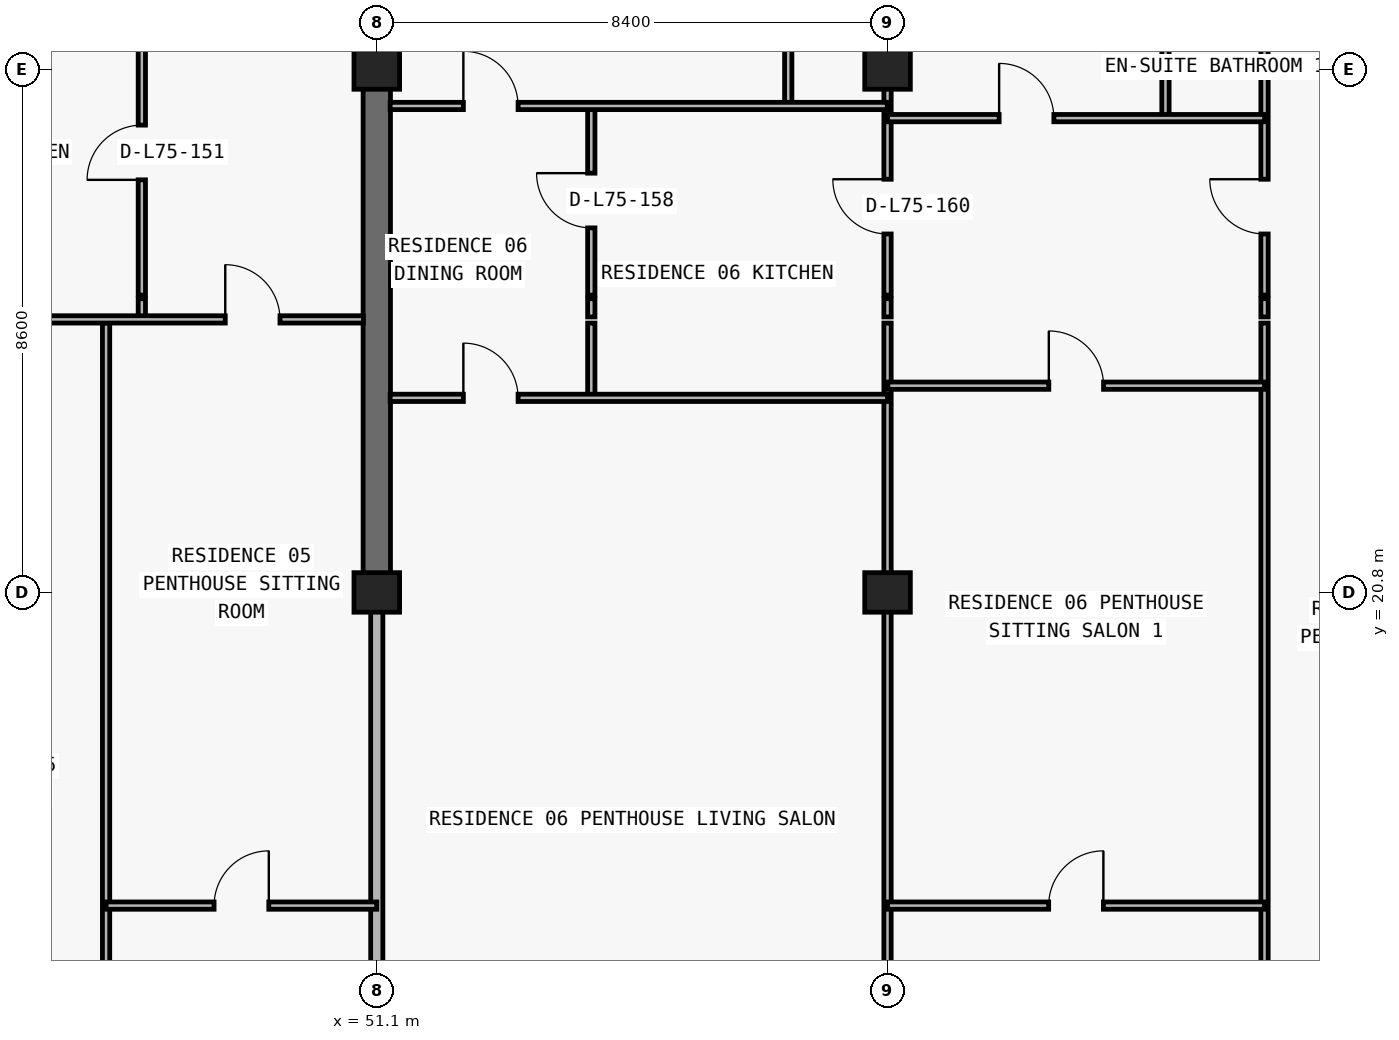
"""IFC4 building model, lengths in metres.
Left out: names, types, materials, properties, quantities, classifications, styles, units other than length and angle.
Written with IfcOpenShell. Run it as: python <this file> out.ifc"""

import sys

from ifc_helpers import new_model, si_unit, direction, frame, frame_2d, origin, origin_2d, place, context, subcontext, project, spatial, rectangle, extrude, element, fill, save


model = new_model("IFC4")
c1 = context("Model", 3, precision=1e-05, world=origin(), true_north=direction((0.0, 1.0)))
c2 = subcontext(c1, "Body", "Model", "MODEL_VIEW")
j1 = project(units=[si_unit("LENGTHUNIT", "METRE"), si_unit("PLANEANGLEUNIT", "RADIAN")], contexts=[c1])
p1 = place(None, origin())
s1 = spatial("IfcSite", under=j1, at=p1, CompositionType="ELEMENT")
p2 = place(p1, origin())
s2 = spatial("IfcBuilding", under=s1, at=p2, CompositionType="ELEMENT")
p3 = place(p2, frame((0.0, 0.0, 266.1)))
s3 = spatial("IfcBuildingStorey", under=s2, at=p3, CompositionType="ELEMENT", Elevation=266.1)
for number, where, z_axis, x_axis in (
    (1, (51.1, 20.8, 0.0), (0.0, 0.0, 1.0), (1.0, 0.0, 0.0)),
    (2, (59.5, 20.8, 0.0), (0.0, 0.0, 1.0), (1.0, 0.0, 0.0)),
    (3, (51.1, 29.4, 0.0), (0.0, 0.0, 1.0), (1.0, 0.0, 0.0)),
    (4, (59.5, 29.4, 0.0), (0.0, 0.0, 1.0), (1.0, 0.0, 0.0)),
):
    element("IfcColumn", number, at=place(p3, frame(where, z_axis=z_axis, x_axis=x_axis)), inside=s3, PredefinedType="COLUMN", context=c2, shape_type="SweptSolid", body=[
        extrude(rectangle(XDim=0.75, YDim=0.65, at=origin_2d()), origin(), (0.0, 0.0, 1.0), 3.0),
    ])
p4 = place(p3, frame((51.1, 20.8, 0.0), z_axis=(0.0, 0.0, 1.0), x_axis=(0.0, 1.0, 0.0)))
e5 = element("IfcWall", 5, at=p4, inside=s3, PredefinedType="SHEAR", context=c2, shape_type="SweptSolid", body=[
    extrude(rectangle(XDim=8.6, YDim=0.45, at=frame_2d((4.3, 0.0))), origin(), (0.0, 0.0, 1.0), 3.0),
])
p5 = place(p3, frame((46.648, 13.34, 0.0), z_axis=(0.0, 0.0, 1.0), x_axis=(0.0, 1.0, 0.0)))
e6 = element("IfcWall", 6, at=p5, inside=s3, PredefinedType="PARTITIONING", context=c2, shape_type="SweptSolid", body=[
    extrude(rectangle(XDim=11.89, YDim=0.12, at=frame_2d((5.945, 0.0))), origin(), (0.0, 0.0, 1.0), 3.0),
])
p6 = place(p3, frame((47.236, 25.33, 0.0), z_axis=(0.0, 0.0, 1.0), x_axis=(0.0, 1.0, 0.0)))
e7 = element("IfcWall", 7, at=p6, inside=s3, PredefinedType="PARTITIONING", context=c2, shape_type="SweptSolid", body=[
    extrude(rectangle(XDim=0.3, YDim=0.12, at=frame_2d((0.15, 0.0))), origin(), (0.0, 0.0, 1.0), 3.0),
])
p7 = place(p3, frame((47.236, 25.69, 0.0), z_axis=(0.0, 0.0, 1.0), x_axis=(0.0, 1.0, 0.0)))
e8 = element("IfcWall", 8, at=p7, inside=s3, PredefinedType="PARTITIONING", context=c2, shape_type="SweptSolid", body=[
    extrude(rectangle(XDim=4.69, YDim=0.12, at=frame_2d((2.345, 0.0))), origin(), (0.0, 0.0, 1.0), 3.0),
])
p8 = place(p7, frame((1.895, 0.0, 0.0)))
e9 = element("IfcOpeningElement", 9, at=p8, cuts=e8, PredefinedType="OPENING", context=c2, shape_type="SweptSolid", body=[
    extrude(rectangle(XDim=0.9, YDim=2.15, at=frame_2d((0.45, 1.075))), frame((0.0, 0.07, 0.0), z_axis=(0.0, -1.0, 0.0), x_axis=(1.0, 0.0, 0.0)), (0.0, 0.0, 1.0), 0.14),
])
p9 = place(p3, frame((51.1, 13.34, 0.0), z_axis=(0.0, 0.0, 1.0), x_axis=(0.0, 1.0, 0.0)))
e10 = element("IfcWall", 10, at=p9, inside=s3, PredefinedType="PARTITIONING", context=c2, shape_type="SweptSolid", body=[
    extrude(rectangle(XDim=7.455, YDim=0.2, at=frame_2d((3.728, 0.0))), origin(), (0.0, 0.0, 1.0), 2.213),
])
p10 = place(p3, frame((51.1, 29.405, 0.0), z_axis=(0.0, 0.0, 1.0), x_axis=(0.0, 1.0, 0.0)))
e11 = element("IfcWall", 11, at=p10, inside=s3, PredefinedType="PARTITIONING", context=c2, shape_type="SweptSolid", body=[
    extrude(rectangle(XDim=0.975, YDim=0.2, at=frame_2d((0.487, 0.0))), origin(), (0.0, 0.0, 1.0), 2.285),
])
p11 = place(p3, frame((54.628, 24.0, 0.0), z_axis=(0.0, 0.0, 1.0), x_axis=(0.0, 1.0, 0.0)))
e12 = element("IfcWall", 12, at=p11, inside=s3, PredefinedType="PARTITIONING", context=c2, shape_type="SweptSolid", body=[
    extrude(rectangle(XDim=1.23, YDim=0.12, at=frame_2d((0.615, 0.0))), origin(), (0.0, 0.0, 1.0), 3.0),
])
p12 = place(p3, frame((54.628, 25.33, 0.0), z_axis=(0.0, 0.0, 1.0), x_axis=(0.0, 1.0, 0.0)))
e13 = element("IfcWall", 13, at=p12, inside=s3, PredefinedType="PARTITIONING", context=c2, shape_type="SweptSolid", body=[
    extrude(rectangle(XDim=0.3, YDim=0.12, at=frame_2d((0.15, 0.0))), origin(), (0.0, 0.0, 1.0), 3.0),
])
p13 = place(p3, frame((54.628, 25.69, 0.0), z_axis=(0.0, 0.0, 1.0), x_axis=(0.0, 1.0, 0.0)))
e14 = element("IfcWall", 14, at=p13, inside=s3, PredefinedType="PARTITIONING", context=c2, shape_type="SweptSolid", body=[
    extrude(rectangle(XDim=3.11, YDim=0.12, at=frame_2d((1.555, 0.0))), origin(), (0.0, 0.0, 1.0), 3.0),
])
p14 = place(p13, frame((1.105, 0.0, 0.0)))
e15 = element("IfcOpeningElement", 15, at=p14, cuts=e14, PredefinedType="OPENING", context=c2, shape_type="SweptSolid", body=[
    extrude(rectangle(XDim=0.9, YDim=2.15, at=frame_2d((0.45, 1.075))), frame((0.0, 0.07, 0.0), z_axis=(0.0, -1.0, 0.0), x_axis=(1.0, 0.0, 0.0)), (0.0, 0.0, 1.0), 0.14),
])
p15 = place(p3, frame((57.867, 28.8, 0.0), z_axis=(0.0, 0.0, 1.0), x_axis=(0.0, 1.0, 0.0)))
e16 = element("IfcWall", 16, at=p15, inside=s3, PredefinedType="PARTITIONING", context=c2, shape_type="SweptSolid", body=[
    extrude(rectangle(XDim=1.58, YDim=0.12, at=frame_2d((0.79, 0.0))), origin(), (0.0, 0.0, 1.0), 3.0),
])
p16 = place(p3, frame((59.5, 13.34, 0.0), z_axis=(0.0, 0.0, 1.0), x_axis=(0.0, 1.0, 0.0)))
e17 = element("IfcWall", 17, at=p16, inside=s3, PredefinedType="PARTITIONING", context=c2, shape_type="SweptSolid", body=[
    extrude(rectangle(XDim=11.89, YDim=0.12, at=frame_2d((5.945, 0.0))), origin(), (0.0, 0.0, 1.0), 2.213),
])
p17 = place(p3, frame((59.5, 25.33, 0.0), z_axis=(0.0, 0.0, 1.0), x_axis=(0.0, 1.0, 0.0)))
e18 = element("IfcWall", 18, at=p17, inside=s3, PredefinedType="PARTITIONING", context=c2, shape_type="SweptSolid", body=[
    extrude(rectangle(XDim=0.3, YDim=0.12, at=frame_2d((0.15, 0.0))), origin(), (0.0, 0.0, 1.0), 2.213),
])
p18 = place(p3, frame((59.5, 25.69, 0.0), z_axis=(0.0, 0.0, 1.0), x_axis=(0.0, 1.0, 0.0)))
e19 = element("IfcWall", 19, at=p18, inside=s3, PredefinedType="PARTITIONING", context=c2, shape_type="SweptSolid", body=[
    extrude(rectangle(XDim=4.69, YDim=0.12, at=frame_2d((2.345, 0.0))), origin(), (0.0, 0.0, 1.0), 2.213),
])
p19 = place(p18, frame((1.005, 0.0, 0.0)))
e20 = element("IfcOpeningElement", 20, at=p19, cuts=e19, PredefinedType="OPENING", context=c2, shape_type="SweptSolid", body=[
    extrude(rectangle(XDim=0.9, YDim=2.15, at=frame_2d((0.45, 1.075))), frame((0.0, 0.07, 0.0), z_axis=(0.0, -1.0, 0.0), x_axis=(1.0, 0.0, 0.0)), (0.0, 0.0, 1.0), 0.14),
])
p20 = place(p3, frame((64.071, 28.6, 0.0), z_axis=(0.0, 0.0, 1.0), x_axis=(0.0, 1.0, 0.0)))
e21 = element("IfcWall", 21, at=p20, inside=s3, PredefinedType="PARTITIONING", context=c2, shape_type="SweptSolid", body=[
    extrude(rectangle(XDim=1.78, YDim=0.12, at=frame_2d((0.89, 0.0))), origin(), (0.0, 0.0, 1.0), 3.0),
])
p21 = place(p3, frame((65.7, 13.42, 0.0), z_axis=(0.0, 0.0, 1.0), x_axis=(0.0, 1.0, 0.0)))
e22 = element("IfcWall", 22, at=p21, inside=s3, PredefinedType="PARTITIONING", context=c2, shape_type="SweptSolid", body=[
    extrude(rectangle(XDim=11.81, YDim=0.12, at=frame_2d((5.905, 0.0))), origin(), (0.0, 0.0, 1.0), 3.0),
])
p22 = place(p3, frame((65.7, 25.33, 0.0), z_axis=(0.0, 0.0, 1.0), x_axis=(0.0, 1.0, 0.0)))
e23 = element("IfcWall", 23, at=p22, inside=s3, PredefinedType="PARTITIONING", context=c2, shape_type="SweptSolid", body=[
    extrude(rectangle(XDim=0.3, YDim=0.12, at=frame_2d((0.15, 0.0))), origin(), (0.0, 0.0, 1.0), 3.0),
])
p23 = place(p3, frame((65.7, 25.69, 0.0), z_axis=(0.0, 0.0, 1.0), x_axis=(0.0, 1.0, 0.0)))
e24 = element("IfcWall", 24, at=p23, inside=s3, PredefinedType="PARTITIONING", context=c2, shape_type="SweptSolid", body=[
    extrude(rectangle(XDim=4.69, YDim=0.12, at=frame_2d((2.345, 0.0))), origin(), (0.0, 0.0, 1.0), 3.0),
])
p24 = place(p23, frame((1.005, 0.0, 0.0)))
e25 = element("IfcOpeningElement", 25, at=p24, cuts=e24, PredefinedType="OPENING", context=c2, shape_type="SweptSolid", body=[
    extrude(rectangle(XDim=0.9, YDim=2.15, at=frame_2d((0.45, 1.075))), frame((0.0, 0.07, 0.0), z_axis=(0.0, -1.0, 0.0), x_axis=(1.0, 0.0, 0.0)), (0.0, 0.0, 1.0), 0.14),
])
p25 = place(p3, frame((46.648, 15.65, 0.0), z_axis=(0.0, 0.0, 1.0), x_axis=(1.0, 0.0, 0.0)))
e26 = element("IfcWall", 26, at=p25, inside=s3, PredefinedType="PARTITIONING", context=c2, shape_type="SweptSolid", body=[
    extrude(rectangle(XDim=4.452, YDim=0.12, at=frame_2d((2.226, 0.0))), origin(), (0.0, 0.0, 1.0), 3.0),
])
p26 = place(p25, frame((1.776, 0.0, 0.0)))
e27 = element("IfcOpeningElement", 27, at=p26, cuts=e26, PredefinedType="OPENING", context=c2, shape_type="SweptSolid", body=[
    extrude(rectangle(XDim=0.9, YDim=2.15, at=frame_2d((0.45, 1.075))), frame((0.0, 0.07, 0.0), z_axis=(0.0, -1.0, 0.0), x_axis=(1.0, 0.0, 0.0)), (0.0, 0.0, 1.0), 0.14),
])
p27 = place(p3, frame((59.5, 15.65, 0.0), z_axis=(0.0, 0.0, 1.0), x_axis=(1.0, 0.0, 0.0)))
e28 = element("IfcWall", 28, at=p27, inside=s3, PredefinedType="PARTITIONING", context=c2, shape_type="SweptSolid", body=[
    extrude(rectangle(XDim=6.2, YDim=0.12, at=frame_2d((3.1, 0.0))), origin(), (0.0, 0.0, 1.0), 3.0),
])
p28 = place(p27, frame((2.65, 0.0, 0.0)))
e29 = element("IfcOpeningElement", 29, at=p28, cuts=e28, PredefinedType="OPENING", context=c2, shape_type="SweptSolid", body=[
    extrude(rectangle(XDim=0.9, YDim=2.15, at=frame_2d((0.45, 1.075))), frame((0.0, 0.07, 0.0), z_axis=(0.0, -1.0, 0.0), x_axis=(1.0, 0.0, 0.0)), (0.0, 0.0, 1.0), 0.14),
])
p29 = place(p3, frame((51.32, 24.0, 0.0), z_axis=(0.0, 0.0, 1.0), x_axis=(1.0, 0.0, 0.0)))
e30 = element("IfcWall", 30, at=p29, inside=s3, PredefinedType="PARTITIONING", context=c2, shape_type="SweptSolid", body=[
    extrude(rectangle(XDim=8.18, YDim=0.12, at=frame_2d((4.09, 0.0))), origin(), (0.0, 0.0, 1.0), 3.0),
])
p30 = place(p29, frame((1.204, 0.0, 0.0)))
e31 = element("IfcOpeningElement", 31, at=p30, cuts=e30, PredefinedType="OPENING", context=c2, shape_type="SweptSolid", body=[
    extrude(rectangle(XDim=0.9, YDim=2.15, at=frame_2d((0.45, 1.075))), frame((0.0, 0.07, 0.0), z_axis=(0.0, -1.0, 0.0), x_axis=(1.0, 0.0, 0.0)), (0.0, 0.0, 1.0), 0.14),
])
p31 = place(p3, frame((59.505, 24.2, 0.0), z_axis=(0.0, 0.0, 1.0), x_axis=(1.0, 0.0, 0.0)))
e32 = element("IfcWall", 32, at=p31, inside=s3, PredefinedType="PARTITIONING", context=c2, shape_type="SweptSolid", body=[
    extrude(rectangle(XDim=6.195, YDim=0.12, at=frame_2d((3.098, 0.0))), origin(), (0.0, 0.0, 1.0), 3.0),
])
p32 = place(p31, frame((2.647, 0.0, 0.0)))
e33 = element("IfcOpeningElement", 33, at=p32, cuts=e32, PredefinedType="OPENING", context=c2, shape_type="SweptSolid", body=[
    extrude(rectangle(XDim=0.9, YDim=2.15, at=frame_2d((0.45, 1.075))), frame((0.0, 0.07, 0.0), z_axis=(0.0, -1.0, 0.0), x_axis=(1.0, 0.0, 0.0)), (0.0, 0.0, 1.0), 0.14),
])
p33 = place(p3, frame((42.7, 25.29, 0.0), z_axis=(0.0, 0.0, 1.0), x_axis=(1.0, 0.0, 0.0)))
e34 = element("IfcWall", 34, at=p33, inside=s3, PredefinedType="PARTITIONING", context=c2, shape_type="SweptSolid", body=[
    extrude(rectangle(XDim=8.18, YDim=0.12, at=frame_2d((4.09, 0.0))), origin(), (0.0, 0.0, 1.0), 3.0),
])
p34 = place(p33, frame((1.524, 0.0, 0.0)))
e35 = element("IfcOpeningElement", 35, at=p34, cuts=e34, PredefinedType="OPENING", context=c2, shape_type="SweptSolid", body=[
    extrude(rectangle(XDim=0.9, YDim=2.15, at=frame_2d((0.45, 1.075))), frame((0.0, 0.07, 0.0), z_axis=(0.0, -1.0, 0.0), x_axis=(1.0, 0.0, 0.0)), (0.0, 0.0, 1.0), 0.14),
])
p35 = place(p33, frame((5.908, 0.0, 0.0)))
e36 = element("IfcOpeningElement", 36, at=p35, cuts=e34, PredefinedType="OPENING", context=c2, shape_type="SweptSolid", body=[
    extrude(rectangle(XDim=0.9, YDim=2.15, at=frame_2d((0.45, 1.075))), frame((0.0, 0.07, 0.0), z_axis=(0.0, -1.0, 0.0), x_axis=(1.0, 0.0, 0.0)), (0.0, 0.0, 1.0), 0.14),
])
p36 = place(p3, frame((59.5, 28.6, 0.0), z_axis=(0.0, 0.0, 1.0), x_axis=(1.0, 0.0, 0.0)))
e37 = element("IfcWall", 37, at=p36, inside=s3, PredefinedType="PARTITIONING", context=c2, shape_type="SweptSolid", body=[
    extrude(rectangle(XDim=6.2, YDim=0.12, at=frame_2d((3.1, 0.0))), origin(), (0.0, 0.0, 1.0), 3.0),
])
p37 = place(p36, frame((1.835, 0.0, 0.0)))
e38 = element("IfcOpeningElement", 38, at=p37, cuts=e37, PredefinedType="OPENING", context=c2, shape_type="SweptSolid", body=[
    extrude(rectangle(XDim=0.9, YDim=2.15, at=frame_2d((0.45, 1.075))), frame((0.0, 0.07, 0.0), z_axis=(0.0, -1.0, 0.0), x_axis=(1.0, 0.0, 0.0)), (0.0, 0.0, 1.0), 0.14),
])
p38 = place(p3, frame((51.32, 28.8, 0.0), z_axis=(0.0, 0.0, 1.0), x_axis=(1.0, 0.0, 0.0)))
e39 = element("IfcWall", 39, at=p38, inside=s3, PredefinedType="PARTITIONING", context=c2, shape_type="SweptSolid", body=[
    extrude(rectangle(XDim=8.175, YDim=0.12, at=frame_2d((4.087, 0.0))), origin(), (0.0, 0.0, 1.0), 3.0),
])
p39 = place(p38, frame((1.204, 0.0, 0.0)))
e40 = element("IfcOpeningElement", 40, at=p39, cuts=e39, PredefinedType="OPENING", context=c2, shape_type="SweptSolid", body=[
    extrude(rectangle(XDim=0.9, YDim=2.15, at=frame_2d((0.45, 1.075))), frame((0.0, 0.07, 0.0), z_axis=(0.0, -1.0, 0.0), x_axis=(1.0, 0.0, 0.0)), (0.0, 0.0, 1.0), 0.14),
])
p40 = place(p8, origin())
e41 = element("IfcDoor", 41, at=p40, inside=s3, OperationType="SINGLE_SWING_LEFT", PredefinedType="DOOR", context=c2, shape_type="SweptSolid", body=[
    extrude(rectangle(XDim=0.9, YDim=2.15, at=frame_2d((0.45, 1.075))), frame((0.0, 0.025, 0.0), z_axis=(0.0, -1.0, 0.0), x_axis=(1.0, 0.0, 0.0)), (0.0, 0.0, 1.0), 0.05),
])
fill(e9, e41)
p41 = place(p35, origin())
e42 = element("IfcDoor", 42, at=p41, inside=s3, OperationType="SINGLE_SWING_LEFT", PredefinedType="DOOR", context=c2, shape_type="SweptSolid", body=[
    extrude(rectangle(XDim=0.9, YDim=2.15, at=frame_2d((0.45, 1.075))), frame((0.0, 0.025, 0.0), z_axis=(0.0, -1.0, 0.0), x_axis=(1.0, 0.0, 0.0)), (0.0, 0.0, 1.0), 0.05),
])
fill(e36, e42)
p42 = place(p26, origin())
e43 = element("IfcDoor", 43, at=p42, inside=s3, OperationType="SINGLE_SWING_RIGHT", PredefinedType="DOOR", context=c2, shape_type="SweptSolid", body=[
    extrude(rectangle(XDim=0.9, YDim=2.15, at=frame_2d((0.45, 1.075))), frame((0.0, 0.025, 0.0), z_axis=(0.0, -1.0, 0.0), x_axis=(1.0, 0.0, 0.0)), (0.0, 0.0, 1.0), 0.05),
])
fill(e27, e43)
p43 = place(p39, origin())
e44 = element("IfcDoor", 44, at=p43, inside=s3, OperationType="SINGLE_SWING_LEFT", PredefinedType="DOOR", context=c2, shape_type="SweptSolid", body=[
    extrude(rectangle(XDim=0.9, YDim=2.15, at=frame_2d((0.45, 1.075))), frame((0.0, 0.025, 0.0), z_axis=(0.0, -1.0, 0.0), x_axis=(1.0, 0.0, 0.0)), (0.0, 0.0, 1.0), 0.05),
])
fill(e40, e44)
p44 = place(p14, origin())
e45 = element("IfcDoor", 45, at=p44, inside=s3, OperationType="SINGLE_SWING_RIGHT", PredefinedType="DOOR", context=c2, shape_type="SweptSolid", body=[
    extrude(rectangle(XDim=0.9, YDim=2.15, at=frame_2d((0.45, 1.075))), frame((0.0, 0.025, 0.0), z_axis=(0.0, -1.0, 0.0), x_axis=(1.0, 0.0, 0.0)), (0.0, 0.0, 1.0), 0.05),
])
fill(e15, e45)
p45 = place(p30, origin())
e46 = element("IfcDoor", 46, at=p45, inside=s3, OperationType="SINGLE_SWING_LEFT", PredefinedType="DOOR", context=c2, shape_type="SweptSolid", body=[
    extrude(rectangle(XDim=0.9, YDim=2.15, at=frame_2d((0.45, 1.075))), frame((0.0, 0.025, 0.0), z_axis=(0.0, -1.0, 0.0), x_axis=(1.0, 0.0, 0.0)), (0.0, 0.0, 1.0), 0.05),
])
fill(e31, e46)
p46 = place(p19, origin())
e47 = element("IfcDoor", 47, at=p46, inside=s3, OperationType="SINGLE_SWING_RIGHT", PredefinedType="DOOR", context=c2, shape_type="SweptSolid", body=[
    extrude(rectangle(XDim=0.9, YDim=2.15, at=frame_2d((0.45, 1.075))), frame((0.0, 0.025, 0.0), z_axis=(0.0, -1.0, 0.0), x_axis=(1.0, 0.0, 0.0)), (0.0, 0.0, 1.0), 0.05),
])
fill(e20, e47)
p47 = place(p37, origin())
e48 = element("IfcDoor", 48, at=p47, inside=s3, OperationType="SINGLE_SWING_LEFT", PredefinedType="DOOR", context=c2, shape_type="SweptSolid", body=[
    extrude(rectangle(XDim=0.9, YDim=2.15, at=frame_2d((0.45, 1.075))), frame((0.0, 0.025, 0.0), z_axis=(0.0, -1.0, 0.0), x_axis=(1.0, 0.0, 0.0)), (0.0, 0.0, 1.0), 0.05),
])
fill(e38, e48)
p48 = place(p32, origin())
e49 = element("IfcDoor", 49, at=p48, inside=s3, OperationType="SINGLE_SWING_LEFT", PredefinedType="DOOR", context=c2, shape_type="SweptSolid", body=[
    extrude(rectangle(XDim=0.9, YDim=2.15, at=frame_2d((0.45, 1.075))), frame((0.0, 0.025, 0.0), z_axis=(0.0, -1.0, 0.0), x_axis=(1.0, 0.0, 0.0)), (0.0, 0.0, 1.0), 0.05),
])
fill(e33, e49)
p49 = place(p28, origin())
e50 = element("IfcDoor", 50, at=p49, inside=s3, OperationType="SINGLE_SWING_RIGHT", PredefinedType="DOOR", context=c2, shape_type="SweptSolid", body=[
    extrude(rectangle(XDim=0.9, YDim=2.15, at=frame_2d((0.45, 1.075))), frame((0.0, 0.025, 0.0), z_axis=(0.0, -1.0, 0.0), x_axis=(1.0, 0.0, 0.0)), (0.0, 0.0, 1.0), 0.05),
])
fill(e29, e50)
p50 = place(p24, origin())
e51 = element("IfcDoor", 51, at=p50, inside=s3, OperationType="SINGLE_SWING_RIGHT", PredefinedType="DOOR", context=c2, shape_type="SweptSolid", body=[
    extrude(rectangle(XDim=0.9, YDim=2.15, at=frame_2d((0.45, 1.075))), frame((0.0, 0.025, 0.0), z_axis=(0.0, -1.0, 0.0), x_axis=(1.0, 0.0, 0.0)), (0.0, 0.0, 1.0), 0.05),
])
fill(e25, e51)
save(model, sys.argv[1])
